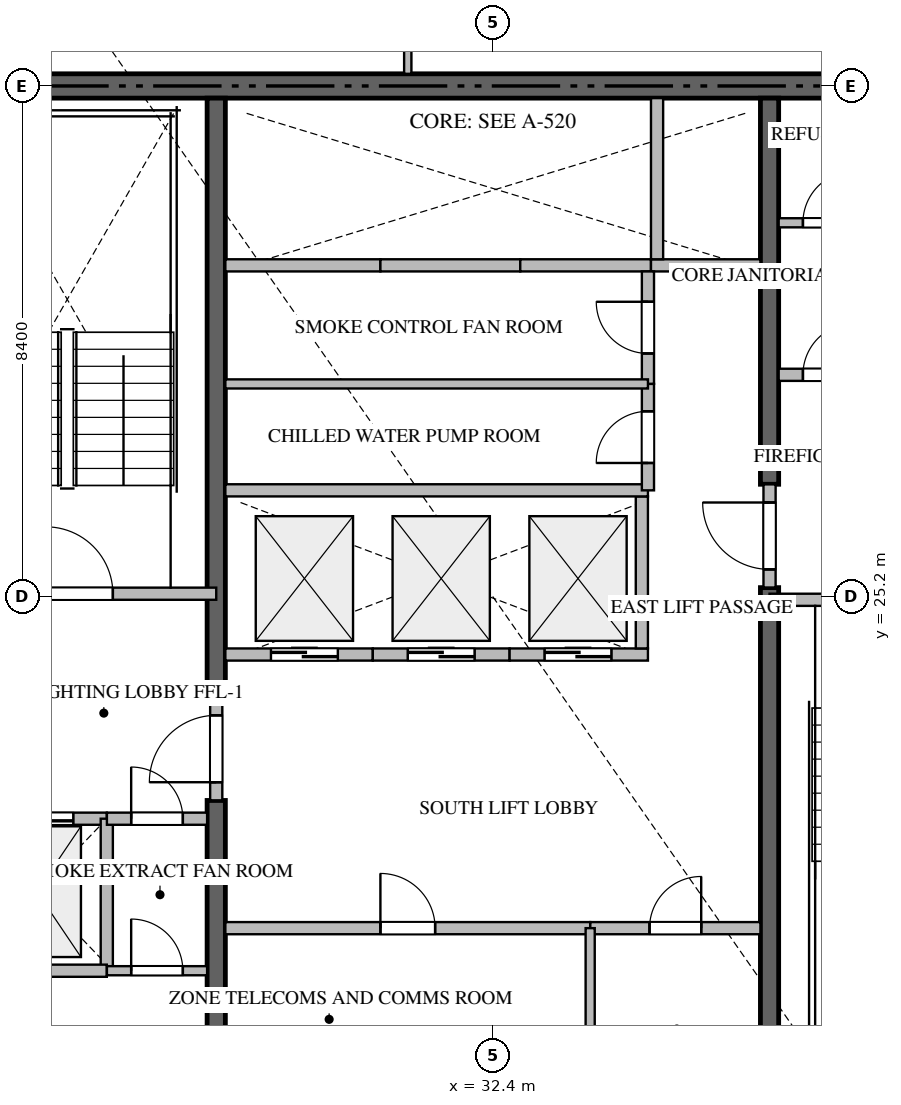
"""IFC4 building model, lengths in metres.
Left out: names, types, materials, properties, quantities, classifications, styles, units other than length and angle.
Written with IfcOpenShell. Run it as: python <this file> out.ifc"""

import sys

from ifc_helpers import new_model, si_unit, direction, frame, frame_2d, origin, place, context, subcontext, project, spatial, rectangle, extrude, source, transform, mapped, element, fill, save


model = new_model("IFC4")
c1 = context("Model", 3, precision=1e-05, world=origin(), true_north=direction((0.0, 1.0)))
c2 = subcontext(c1, "Body", "Model", "MODEL_VIEW")
j1 = project(units=[si_unit("LENGTHUNIT", "METRE"), si_unit("PLANEANGLEUNIT", "RADIAN")], contexts=[c1])
p1 = place(None, origin())
s1 = spatial("IfcSite", under=j1, at=p1, CompositionType="ELEMENT")
p2 = place(p1, origin())
s2 = spatial("IfcBuilding", under=s1, at=p2, CompositionType="ELEMENT")
p3 = place(p2, frame((0.0, 0.0, 135.15)))
s3 = spatial("IfcBuildingStorey", under=s2, at=p3, CompositionType="ELEMENT", Elevation=135.15)
p4 = place(p3, frame((41.4, 33.6, -0.26), z_axis=(0.0, 0.0, 1.0), x_axis=(-1.0, 0.0, 0.0)))
e1 = element("IfcWall", 1, at=p4, inside=s3, PredefinedType="SHEAR", context=c2, shape_type="SweptSolid", body=[
    extrude(rectangle(XDim=18.0, YDim=0.4, at=frame_2d((9.0, 0.0))), origin(), (0.0, 0.0, 1.0), 3.748),
])
p5 = place(p3, frame((27.85, 17.0, -0.26), z_axis=(0.0, 0.0, 1.0), x_axis=(0.0, 1.0, 0.0)))
e2 = element("IfcWall", 2, at=p5, inside=s3, PredefinedType="SHEAR", context=c2, shape_type="SweptSolid", body=[
    extrude(rectangle(XDim=4.85, YDim=0.3, at=frame_2d((2.425, 0.0))), origin(), (0.0, 0.0, 1.0), 3.748),
])
p6 = place(p3, frame((27.85, 23.55, -0.26), z_axis=(0.0, 0.0, 1.0), x_axis=(0.0, 1.0, 0.0)))
e3 = element("IfcWall", 3, at=p6, inside=s3, PredefinedType="SHEAR", context=c2, shape_type="SweptSolid", body=[
    extrude(rectangle(XDim=9.85, YDim=0.3, at=frame_2d((4.925, 0.0))), origin(), (0.0, 0.0, 1.0), 3.748),
])
p7 = place(p3, frame((36.95, 17.0, -0.26), z_axis=(0.0, 0.0, 1.0), x_axis=(0.0, 1.0, 0.0)))
e4 = element("IfcWall", 4, at=p7, inside=s3, PredefinedType="SHEAR", context=c2, shape_type="SweptSolid", body=[
    extrude(rectangle(XDim=8.35, YDim=0.3, at=frame_2d((4.175, 0.0))), origin(), (0.0, 0.0, 1.0), 3.748),
])
p8 = place(p3, frame((36.95, 27.05, -0.26), z_axis=(0.0, 0.0, 1.0), x_axis=(0.0, 1.0, 0.0)))
e5 = element("IfcWall", 5, at=p8, inside=s3, PredefinedType="SHEAR", context=c2, shape_type="SweptSolid", body=[
    extrude(rectangle(XDim=6.35, YDim=0.3, at=frame_2d((3.175, 0.0))), origin(), (0.0, 0.0, 1.0), 3.748),
])
p9 = place(p3, frame((23.4, 25.25, 0.0), z_axis=(0.0, 0.0, 1.0), x_axis=(1.0, 0.0, 0.0)))
e6 = element("IfcWall", 6, at=p9, inside=s3, PredefinedType="STANDARD", context=c2, shape_type="SweptSolid", body=[
    extrude(rectangle(XDim=4.45, YDim=0.2, at=frame_2d((2.225, 0.0))), origin(), (0.0, 0.0, 1.0), 3.49),
])
p10 = place(p9, frame((1.65, 0.0, 0.0)))
e7 = element("IfcOpeningElement", 7, at=p10, cuts=e6, PredefinedType="OPENING", context=c2, shape_type="SweptSolid", body=[
    extrude(rectangle(XDim=1.1, YDim=2.15, at=frame_2d((0.55, 1.075))), frame((0.0, 0.11, 0.0), z_axis=(0.0, -1.0, 0.0), x_axis=(1.0, 0.0, 0.0)), (0.0, 0.0, 1.0), 0.22),
])
p11 = place(p3, frame((36.95, 25.15, 0.0), z_axis=(0.0, 0.0, 1.0), x_axis=(1.0, 0.0, 0.0)))
e8 = element("IfcWall", 8, at=p11, inside=s3, PredefinedType="STANDARD", context=c2, shape_type="SweptSolid", body=[
    extrude(rectangle(XDim=4.45, YDim=0.2, at=frame_2d((2.225, 0.0))), origin(), (0.0, 0.0, 1.0), 3.49),
])
p12 = place(p11, frame((1.65, 0.0, 0.0)))
e9 = element("IfcOpeningElement", 9, at=p12, cuts=e8, PredefinedType="OPENING", context=c2, shape_type="SweptSolid", body=[
    extrude(rectangle(XDim=1.1, YDim=2.15, at=frame_2d((0.55, 1.075))), frame((0.0, 0.11, 0.0), z_axis=(0.0, -1.0, 0.0), x_axis=(1.0, 0.0, 0.0)), (0.0, 0.0, 1.0), 0.22),
])
p13 = place(p3, frame((23.6, 21.55, 0.0), z_axis=(0.0, 0.0, 1.0), x_axis=(1.0, 0.0, 0.0)))
e10 = element("IfcWall", 10, at=p13, inside=s3, PredefinedType="STANDARD", context=c2, shape_type="SweptSolid", body=[
    extrude(rectangle(XDim=2.45, YDim=0.2, at=frame_2d((1.225, 0.0))), origin(), (0.0, 0.0, 1.0), 3.49),
])
p14 = place(p13, frame((0.7, 0.0, 0.0)))
e11 = element("IfcOpeningElement", 11, at=p14, cuts=e10, PredefinedType="OPENING", context=c2, shape_type="SweptSolid", body=[
    extrude(rectangle(XDim=1.2, YDim=2.2, at=frame_2d((0.6, 1.1))), frame((0.0, 0.11, 0.0), z_axis=(0.0, -1.0, 0.0), x_axis=(1.0, 0.0, 0.0)), (0.0, 0.0, 1.0), 0.22),
])
p15 = place(p3, frame((28.0, 24.25, 0.0), z_axis=(0.0, 0.0, 1.0), x_axis=(1.0, 0.0, 0.0)))
e12 = element("IfcWall", 12, at=p15, inside=s3, PredefinedType="STANDARD", context=c2, shape_type="SweptSolid", body=[
    extrude(rectangle(XDim=2.425, YDim=0.2, at=frame_2d((1.212, 0.0))), origin(), (0.0, 0.0, 1.0), 3.49),
])
p16 = place(p15, frame((0.75, 0.0, 0.0)))
e13 = element("IfcOpeningElement", 13, at=p16, cuts=e12, PredefinedType="OPENING", context=c2, shape_type="SweptSolid", body=[
    extrude(rectangle(XDim=1.1, YDim=2.2, at=frame_2d((0.55, 1.1))), frame((0.0, 0.11, 0.0), z_axis=(0.0, -1.0, 0.0), x_axis=(1.0, 0.0, 0.0)), (0.0, 0.0, 1.0), 0.22),
])
p17 = place(p3, frame((30.425, 24.25, 0.0), z_axis=(0.0, 0.0, 1.0), x_axis=(1.0, 0.0, 0.0)))
e14 = element("IfcWall", 14, at=p17, inside=s3, PredefinedType="STANDARD", context=c2, shape_type="SweptSolid", body=[
    extrude(rectangle(XDim=2.25, YDim=0.2, at=frame_2d((1.125, 0.0))), origin(), (0.0, 0.0, 1.0), 3.49),
])
p18 = place(p17, frame((0.575, 0.0, 0.0)))
e15 = element("IfcOpeningElement", 15, at=p18, cuts=e14, PredefinedType="OPENING", context=c2, shape_type="SweptSolid", body=[
    extrude(rectangle(XDim=1.1, YDim=2.2, at=frame_2d((0.55, 1.1))), frame((0.0, 0.11, 0.0), z_axis=(0.0, -1.0, 0.0), x_axis=(1.0, 0.0, 0.0)), (0.0, 0.0, 1.0), 0.22),
])
p19 = place(p3, frame((32.675, 24.25, 0.0), z_axis=(0.0, 0.0, 1.0), x_axis=(1.0, 0.0, 0.0)))
e16 = element("IfcWall", 16, at=p19, inside=s3, PredefinedType="STANDARD", context=c2, shape_type="SweptSolid", body=[
    extrude(rectangle(XDim=2.275, YDim=0.2, at=frame_2d((1.137, 0.0))), origin(), (0.0, 0.0, 1.0), 3.49),
])
p20 = place(p19, frame((0.575, 0.0, 0.0)))
e17 = element("IfcOpeningElement", 17, at=p20, cuts=e16, PredefinedType="OPENING", context=c2, shape_type="SweptSolid", body=[
    extrude(rectangle(XDim=1.1, YDim=2.2, at=frame_2d((0.55, 1.1))), frame((0.0, 0.11, 0.0), z_axis=(0.0, -1.0, 0.0), x_axis=(1.0, 0.0, 0.0)), (0.0, 0.0, 1.0), 0.22),
])
p21 = place(p3, frame((34.85, 24.35, 0.0), z_axis=(0.0, 0.0, 1.0), x_axis=(0.0, 1.0, 0.0)))
e18 = element("IfcWall", 18, at=p21, inside=s3, PredefinedType="STANDARD", context=c2, shape_type="SweptSolid", body=[
    extrude(rectangle(XDim=2.5, YDim=0.2, at=frame_2d((1.25, 0.0))), origin(), (0.0, 0.0, 1.0), 3.49),
])
p22 = place(p3, frame((28.0, 30.65, 0.0), z_axis=(0.0, 0.0, 1.0), x_axis=(1.0, 0.0, 0.0)))
e19 = element("IfcWall", 19, at=p22, inside=s3, PredefinedType="STANDARD", context=c2, shape_type="SweptSolid", body=[
    extrude(rectangle(XDim=2.55, YDim=0.2, at=frame_2d((1.275, 0.0))), origin(), (0.0, 0.0, 1.0), 3.49),
])
p23 = place(p3, frame((30.55, 30.65, 0.0), z_axis=(0.0, 0.0, 1.0), x_axis=(1.0, 0.0, 0.0)))
e20 = element("IfcWall", 20, at=p23, inside=s3, PredefinedType="STANDARD", context=c2, shape_type="SweptSolid", body=[
    extrude(rectangle(XDim=2.3, YDim=0.2, at=frame_2d((1.15, 0.0))), origin(), (0.0, 0.0, 1.0), 3.49),
])
p24 = place(p3, frame((32.85, 30.65, 0.0), z_axis=(0.0, 0.0, 1.0), x_axis=(1.0, 0.0, 0.0)))
e21 = element("IfcWall", 21, at=p24, inside=s3, PredefinedType="STANDARD", context=c2, shape_type="SweptSolid", body=[
    extrude(rectangle(XDim=2.15, YDim=0.2, at=frame_2d((1.075, 0.0))), origin(), (0.0, 0.0, 1.0), 3.49),
])
p25 = place(p3, frame((35.0, 30.65, 0.0), z_axis=(0.0, 0.0, 1.0), x_axis=(1.0, 0.0, 0.0)))
e22 = element("IfcWall", 22, at=p25, inside=s3, PredefinedType="STANDARD", context=c2, shape_type="SweptSolid", body=[
    extrude(rectangle(XDim=1.8, YDim=0.2, at=frame_2d((0.9, 0.0))), origin(), (0.0, 0.0, 1.0), 3.49),
])
p26 = place(p3, frame((35.1, 30.75, 0.0), z_axis=(0.0, 0.0, 1.0), x_axis=(0.0, 1.0, 0.0)))
e23 = element("IfcWall", 23, at=p26, inside=s3, PredefinedType="STANDARD", context=c2, shape_type="SweptSolid", body=[
    extrude(rectangle(XDim=2.65, YDim=0.2, at=frame_2d((1.325, 0.0))), origin(), (0.0, 0.0, 1.0), 3.49),
])
p27 = place(p3, frame((26.05, 19.05, 0.0), z_axis=(0.0, 0.0, 1.0), x_axis=(0.0, 1.0, 0.0)))
e24 = element("IfcWall", 24, at=p27, inside=s3, PredefinedType="STANDARD", context=c2, shape_type="SweptSolid", body=[
    extrude(rectangle(XDim=2.5, YDim=0.2, at=frame_2d((1.25, 0.0))), origin(), (0.0, 0.0, 1.0), 3.49),
])
p28 = place(p3, frame((23.6, 19.05, 0.0), z_axis=(0.0, 0.0, 1.0), x_axis=(1.0, 0.0, 0.0)))
e25 = element("IfcWall", 25, at=p28, inside=s3, PredefinedType="STANDARD", context=c2, shape_type="SweptSolid", body=[
    extrude(rectangle(XDim=2.45, YDim=0.2, at=frame_2d((1.225, 0.0))), origin(), (0.0, 0.0, 1.0), 3.49),
])
p29 = place(p3, frame((26.052, 21.55, 0.0), z_axis=(0.0, 0.0, 1.0), x_axis=(1.0, 0.0, 0.0)))
e26 = element("IfcWall", 26, at=p29, inside=s3, PredefinedType="STANDARD", context=c2, shape_type="SweptSolid", body=[
    extrude(rectangle(XDim=1.648, YDim=0.2, at=frame_2d((0.824, 0.0))), origin(), (0.0, 0.0, 1.0), 3.49),
])
p30 = place(p29, frame((0.399, 0.0, 0.0)))
e27 = element("IfcOpeningElement", 27, at=p30, cuts=e26, PredefinedType="OPENING", context=c2, shape_type="SweptSolid", body=[
    extrude(rectangle(XDim=0.85, YDim=2.1, at=frame_2d((0.425, 1.05))), frame((0.0, 0.11, 0.0), z_axis=(0.0, -1.0, 0.0), x_axis=(1.0, 0.0, 0.0)), (0.0, 0.0, 1.0), 0.22),
])
p31 = place(p3, frame((37.1, 28.85, 0.0), z_axis=(0.0, 0.0, 1.0), x_axis=(1.0, 0.0, 0.0)))
e28 = element("IfcWall", 28, at=p31, inside=s3, PredefinedType="STANDARD", context=c2, shape_type="SweptSolid", body=[
    extrude(rectangle(XDim=1.648, YDim=0.2, at=frame_2d((0.824, 0.0))), origin(), (0.0, 0.0, 1.0), 3.49),
])
p32 = place(p31, frame((0.399, 0.0, 0.0)))
e29 = element("IfcOpeningElement", 29, at=p32, cuts=e28, PredefinedType="OPENING", context=c2, shape_type="SweptSolid", body=[
    extrude(rectangle(XDim=0.85, YDim=2.1, at=frame_2d((0.425, 1.05))), frame((0.0, 0.11, 0.0), z_axis=(0.0, -1.0, 0.0), x_axis=(1.0, 0.0, 0.0)), (0.0, 0.0, 1.0), 0.22),
])
p33 = place(p3, frame((27.85, 21.852, 0.0), z_axis=(0.0, 0.0, 1.0), x_axis=(0.0, 1.0, 0.0)))
e30 = element("IfcWall", 30, at=p33, inside=s3, PredefinedType="STANDARD", context=c2, shape_type="SweptSolid", body=[
    extrude(rectangle(XDim=1.696, YDim=0.2, at=frame_2d((0.848, 0.0))), origin(), (0.0, 0.0, 1.0), 3.49),
])
p34 = place(p33, frame((0.298, 0.0, 0.0)))
e31 = element("IfcOpeningElement", 31, at=p34, cuts=e30, PredefinedType="OPENING", context=c2, shape_type="SweptSolid", body=[
    extrude(rectangle(XDim=1.1, YDim=2.15, at=frame_2d((0.55, 1.075))), frame((0.0, 0.11, 0.0), z_axis=(0.0, -1.0, 0.0), x_axis=(1.0, 0.0, 0.0)), (0.0, 0.0, 1.0), 0.22),
])
p35 = place(p3, frame((36.95, 25.352, 0.0), z_axis=(0.0, 0.0, 1.0), x_axis=(0.0, 1.0, 0.0)))
e32 = element("IfcWall", 32, at=p35, inside=s3, PredefinedType="STANDARD", context=c2, shape_type="SweptSolid", body=[
    extrude(rectangle(XDim=1.696, YDim=0.2, at=frame_2d((0.848, 0.0))), origin(), (0.0, 0.0, 1.0), 3.49),
])
p36 = place(p35, frame((0.298, 0.0, 0.0)))
e33 = element("IfcOpeningElement", 33, at=p36, cuts=e32, PredefinedType="OPENING", context=c2, shape_type="SweptSolid", body=[
    extrude(rectangle(XDim=1.1, YDim=2.15, at=frame_2d((0.55, 1.075))), frame((0.0, 0.11, 0.0), z_axis=(0.0, -1.0, 0.0), x_axis=(1.0, 0.0, 0.0)), (0.0, 0.0, 1.0), 0.22),
])
p37 = place(p3, frame((28.0, 26.95, 0.0), z_axis=(0.0, 0.0, 1.0), x_axis=(1.0, 0.0, 0.0)))
e34 = element("IfcWall", 34, at=p37, inside=s3, PredefinedType="STANDARD", context=c2, shape_type="SweptSolid", body=[
    extrude(rectangle(XDim=6.95, YDim=0.2, at=frame_2d((3.475, 0.0))), origin(), (0.0, 0.0, 1.0), 3.49),
])
p38 = place(p3, frame((26.052, 19.05, 0.0), z_axis=(0.0, 0.0, 1.0), x_axis=(1.0, 0.0, 0.0)))
e35 = element("IfcWall", 35, at=p38, inside=s3, PredefinedType="PARTITIONING", context=c2, shape_type="SweptSolid", body=[
    extrude(rectangle(XDim=1.648, YDim=0.15, at=frame_2d((0.824, 0.0))), origin(), (0.0, 0.0, 1.0), 3.49),
])
p39 = place(p38, frame((0.399, 0.0, 0.0)))
e36 = element("IfcOpeningElement", 36, at=p39, cuts=e35, PredefinedType="OPENING", context=c2, shape_type="SweptSolid", body=[
    extrude(rectangle(XDim=0.85, YDim=2.1, at=frame_2d((0.425, 1.05))), frame((0.0, 0.085, 0.0), z_axis=(0.0, -1.0, 0.0), x_axis=(1.0, 0.0, 0.0)), (0.0, 0.0, 1.0), 0.17),
])
p40 = place(p3, frame((37.1, 31.35, 0.0), z_axis=(0.0, 0.0, 1.0), x_axis=(1.0, 0.0, 0.0)))
e37 = element("IfcWall", 37, at=p40, inside=s3, PredefinedType="PARTITIONING", context=c2, shape_type="SweptSolid", body=[
    extrude(rectangle(XDim=1.648, YDim=0.15, at=frame_2d((0.824, 0.0))), origin(), (0.0, 0.0, 1.0), 3.49),
])
p41 = place(p40, frame((0.399, 0.0, 0.0)))
e38 = element("IfcOpeningElement", 38, at=p41, cuts=e37, PredefinedType="OPENING", context=c2, shape_type="SweptSolid", body=[
    extrude(rectangle(XDim=0.85, YDim=2.1, at=frame_2d((0.425, 1.05))), frame((0.0, 0.085, 0.0), z_axis=(0.0, -1.0, 0.0), x_axis=(1.0, 0.0, 0.0)), (0.0, 0.0, 1.0), 0.17),
])
p42 = place(p3, frame((34.95, 26.95, 0.0), z_axis=(0.0, 0.0, 1.0), x_axis=(0.0, 1.0, 0.0)))
e39 = element("IfcWall", 39, at=p42, inside=s3, PredefinedType="STANDARD", context=c2, shape_type="SweptSolid", body=[
    extrude(rectangle(XDim=1.75, YDim=0.2, at=frame_2d((0.875, 0.0))), origin(), (0.0, 0.0, 1.0), 3.49),
])
p43 = place(p42, frame((0.45, 0.0, 0.0)))
e40 = element("IfcOpeningElement", 40, at=p43, cuts=e39, PredefinedType="OPENING", context=c2, shape_type="SweptSolid", body=[
    extrude(rectangle(XDim=0.85, YDim=2.1, at=frame_2d((0.425, 1.05))), frame((0.0, 0.11, 0.0), z_axis=(0.0, -1.0, 0.0), x_axis=(1.0, 0.0, 0.0)), (0.0, 0.0, 1.0), 0.22),
])
p44 = place(p3, frame((34.95, 28.702, 0.0), z_axis=(0.0, 0.0, 1.0), x_axis=(0.0, 1.0, 0.0)))
e41 = element("IfcWall", 41, at=p44, inside=s3, PredefinedType="STANDARD", context=c2, shape_type="SweptSolid", body=[
    extrude(rectangle(XDim=1.848, YDim=0.2, at=frame_2d((0.924, 0.0))), origin(), (0.0, 0.0, 1.0), 3.49),
])
p45 = place(p44, frame((0.499, 0.0, 0.0)))
e42 = element("IfcOpeningElement", 42, at=p45, cuts=e41, PredefinedType="OPENING", context=c2, shape_type="SweptSolid", body=[
    extrude(rectangle(XDim=0.85, YDim=2.1, at=frame_2d((0.425, 1.05))), frame((0.0, 0.11, 0.0), z_axis=(0.0, -1.0, 0.0), x_axis=(1.0, 0.0, 0.0)), (0.0, 0.0, 1.0), 0.22),
])
p46 = place(p3, frame((28.0, 28.7, 0.0), z_axis=(0.0, 0.0, 1.0), x_axis=(1.0, 0.0, 0.0)))
e43 = element("IfcWall", 43, at=p46, inside=s3, PredefinedType="PARTITIONING", context=c2, shape_type="SweptSolid", body=[
    extrude(rectangle(XDim=6.95, YDim=0.15, at=frame_2d((3.475, 0.0))), origin(), (0.0, 0.0, 1.0), 3.49),
])
p47 = place(p3, frame((28.0, 19.75, 0.0), z_axis=(0.0, 0.0, 1.0), x_axis=(1.0, 0.0, 0.0)))
e44 = element("IfcWall", 44, at=p47, inside=s3, PredefinedType="STANDARD", context=c2, shape_type="SweptSolid", body=[
    extrude(rectangle(XDim=6.0, YDim=0.2, at=frame_2d((3.0, 0.0))), origin(), (0.0, 0.0, 1.0), 3.49),
])
p48 = place(p47, frame((2.55, 0.0, 0.0)))
e45 = element("IfcOpeningElement", 45, at=p48, cuts=e44, PredefinedType="OPENING", context=c2, shape_type="SweptSolid", body=[
    extrude(rectangle(XDim=0.9, YDim=2.1, at=frame_2d((0.45, 1.05))), frame((0.0, 0.11, 0.0), z_axis=(0.0, -1.0, 0.0), x_axis=(1.0, 0.0, 0.0)), (0.0, 0.0, 1.0), 0.22),
])
p49 = place(p3, frame((34.002, 19.75, 0.0), z_axis=(0.0, 0.0, 1.0), x_axis=(1.0, 0.0, 0.0)))
e46 = element("IfcWall", 46, at=p49, inside=s3, PredefinedType="STANDARD", context=c2, shape_type="SweptSolid", body=[
    extrude(rectangle(XDim=2.798, YDim=0.2, at=frame_2d((1.399, 0.0))), origin(), (0.0, 0.0, 1.0), 3.49),
])
p50 = place(p49, frame((0.974, 0.0, 0.0)))
e47 = element("IfcOpeningElement", 47, at=p50, cuts=e46, PredefinedType="OPENING", context=c2, shape_type="SweptSolid", body=[
    extrude(rectangle(XDim=0.85, YDim=2.1, at=frame_2d((0.425, 1.05))), frame((0.0, 0.11, 0.0), z_axis=(0.0, -1.0, 0.0), x_axis=(1.0, 0.0, 0.0)), (0.0, 0.0, 1.0), 0.22),
])
p51 = place(p3, frame((34.0, 17.02, 0.0), z_axis=(0.0, 0.0, 1.0), x_axis=(0.0, 1.0, 0.0)))
e48 = element("IfcWall", 48, at=p51, inside=s3, PredefinedType="PARTITIONING", context=c2, shape_type="SweptSolid", body=[
    extrude(rectangle(XDim=2.73, YDim=0.15, at=frame_2d((1.365, 0.0))), origin(), (0.0, 0.0, 1.0), 3.49),
])
p52 = place(p3, frame((31.0, 35.748, 0.0), z_axis=(0.0, 0.0, 1.0), x_axis=(0.0, -1.0, 0.0)))
e49 = element("IfcWall", 49, at=p52, inside=s3, PredefinedType="PARTITIONING", context=c2, shape_type="SweptSolid", body=[
    extrude(rectangle(XDim=1.948, YDim=0.12, at=frame_2d((0.974, 0.0))), origin(), (0.0, 0.0, 1.0), 3.49),
])
m1 = source(origin(), c2, "Body", "SweptSolid", [
    extrude(rectangle(XDim=1.1, YDim=2.15, at=frame_2d((0.55, 1.075))), frame((0.0, 0.025, 0.0), z_axis=(0.0, -1.0, 0.0), x_axis=(1.0, 0.0, 0.0)), (0.0, 0.0, 1.0), 0.05),
])
p53 = place(p10, origin())
e50 = element("IfcDoor", 50, at=p53, inside=s3, OperationType="SINGLE_SWING_LEFT", PredefinedType="DOOR", context=c2, shape_type="MappedRepresentation", body=[
    mapped(m1, transform((0.0, 0.0, 0.0), scale=1.0)),
])
fill(e7, e50)
m2 = source(origin(), c2, "Body", "SweptSolid", [
    extrude(rectangle(XDim=1.2, YDim=2.2, at=frame_2d((0.6, 1.1))), frame((0.0, 0.025, 0.0), z_axis=(0.0, -1.0, 0.0), x_axis=(1.0, 0.0, 0.0)), (0.0, 0.0, 1.0), 0.05),
])
p54 = place(p14, origin())
e51 = element("IfcDoor", 51, at=p54, inside=s3, OperationType="DOUBLE_DOOR_SLIDING", PredefinedType="DOOR", context=c2, shape_type="MappedRepresentation", body=[
    mapped(m2, transform((0.0, 0.0, 0.0), scale=1.0)),
])
fill(e11, e51)
m3 = source(origin(), c2, "Body", "SweptSolid", [
    extrude(rectangle(XDim=1.1, YDim=2.2, at=frame_2d((0.55, 1.1))), frame((0.0, 0.025, 0.0), z_axis=(0.0, -1.0, 0.0), x_axis=(1.0, 0.0, 0.0)), (0.0, 0.0, 1.0), 0.05),
])
p55 = place(p16, origin())
e52 = element("IfcDoor", 52, at=p55, inside=s3, OperationType="DOUBLE_DOOR_SLIDING", PredefinedType="DOOR", context=c2, shape_type="MappedRepresentation", body=[
    mapped(m3, transform((0.0, 0.0, 0.0), scale=1.0)),
])
fill(e13, e52)
p56 = place(p18, origin())
e53 = element("IfcDoor", 53, at=p56, inside=s3, OperationType="DOUBLE_DOOR_SLIDING", PredefinedType="DOOR", context=c2, shape_type="MappedRepresentation", body=[
    mapped(m3, transform((0.0, 0.0, 0.0), scale=1.0)),
])
fill(e15, e53)
p57 = place(p20, origin())
e54 = element("IfcDoor", 54, at=p57, inside=s3, OperationType="DOUBLE_DOOR_SLIDING", PredefinedType="DOOR", context=c2, shape_type="MappedRepresentation", body=[
    mapped(m3, transform((0.0, 0.0, 0.0), scale=1.0)),
])
fill(e17, e54)
m4 = source(origin(), c2, "Body", "SweptSolid", [
    extrude(rectangle(XDim=0.85, YDim=2.1, at=frame_2d((0.425, 1.05))), frame((0.0, 0.025, 0.0), z_axis=(0.0, -1.0, 0.0), x_axis=(1.0, 0.0, 0.0)), (0.0, 0.0, 1.0), 0.05),
])
p58 = place(p30, origin())
e55 = element("IfcDoor", 55, at=p58, inside=s3, OperationType="SINGLE_SWING_LEFT", PredefinedType="DOOR", context=c2, shape_type="MappedRepresentation", body=[
    mapped(m4, transform((0.0, 0.0, 0.0), scale=1.0)),
])
fill(e27, e55)
p59 = place(p32, origin())
e56 = element("IfcDoor", 56, at=p59, inside=s3, OperationType="SINGLE_SWING_RIGHT", PredefinedType="DOOR", context=c2, shape_type="MappedRepresentation", body=[
    mapped(m4, transform((0.0, 0.0, 0.0), scale=1.0)),
])
fill(e29, e56)
p60 = place(p34, origin())
e57 = element("IfcDoor", 57, at=p60, inside=s3, OperationType="SINGLE_SWING_LEFT", PredefinedType="DOOR", context=c2, shape_type="MappedRepresentation", body=[
    mapped(m1, transform((0.0, 0.0, 0.0), scale=1.0)),
])
fill(e31, e57)
p61 = place(p36, origin())
e58 = element("IfcDoor", 58, at=p61, inside=s3, OperationType="SINGLE_SWING_RIGHT", PredefinedType="DOOR", context=c2, shape_type="MappedRepresentation", body=[
    mapped(m1, transform((0.0, 0.0, 0.0), scale=1.0)),
])
fill(e33, e58)
p62 = place(p39, origin())
e59 = element("IfcDoor", 59, at=p62, inside=s3, OperationType="SINGLE_SWING_LEFT", PredefinedType="DOOR", context=c2, shape_type="MappedRepresentation", body=[
    mapped(m4, transform((0.0, 0.0, 0.0), scale=1.0)),
])
fill(e36, e59)
p63 = place(p41, origin())
e60 = element("IfcDoor", 60, at=p63, inside=s3, OperationType="SINGLE_SWING_RIGHT", PredefinedType="DOOR", context=c2, shape_type="MappedRepresentation", body=[
    mapped(m4, transform((0.0, 0.0, 0.0), scale=1.0)),
])
fill(e38, e60)
p64 = place(p43, origin())
e61 = element("IfcDoor", 61, at=p64, inside=s3, OperationType="SINGLE_SWING_LEFT", PredefinedType="DOOR", context=c2, shape_type="MappedRepresentation", body=[
    mapped(m4, transform((0.0, 0.0, 0.0), scale=1.0)),
])
fill(e40, e61)
p65 = place(p45, origin())
e62 = element("IfcDoor", 62, at=p65, inside=s3, OperationType="SINGLE_SWING_RIGHT", PredefinedType="DOOR", context=c2, shape_type="MappedRepresentation", body=[
    mapped(m4, transform((0.0, 0.0, 0.0), scale=1.0)),
])
fill(e42, e62)
m5 = source(origin(), c2, "Body", "SweptSolid", [
    extrude(rectangle(XDim=0.9, YDim=2.1, at=frame_2d((0.45, 1.05))), frame((0.0, 0.025, 0.0), z_axis=(0.0, -1.0, 0.0), x_axis=(1.0, 0.0, 0.0)), (0.0, 0.0, 1.0), 0.05),
])
p66 = place(p48, origin())
e63 = element("IfcDoor", 63, at=p66, inside=s3, OperationType="SINGLE_SWING_LEFT", PredefinedType="DOOR", context=c2, shape_type="MappedRepresentation", body=[
    mapped(m5, transform((0.0, 0.0, 0.0), scale=1.0)),
])
fill(e45, e63)
p67 = place(p50, origin())
e64 = element("IfcDoor", 64, at=p67, inside=s3, OperationType="SINGLE_SWING_RIGHT", PredefinedType="DOOR", context=c2, shape_type="MappedRepresentation", body=[
    mapped(m4, transform((0.0, 0.0, 0.0), scale=1.0)),
])
fill(e47, e64)
save(model, sys.argv[1])
